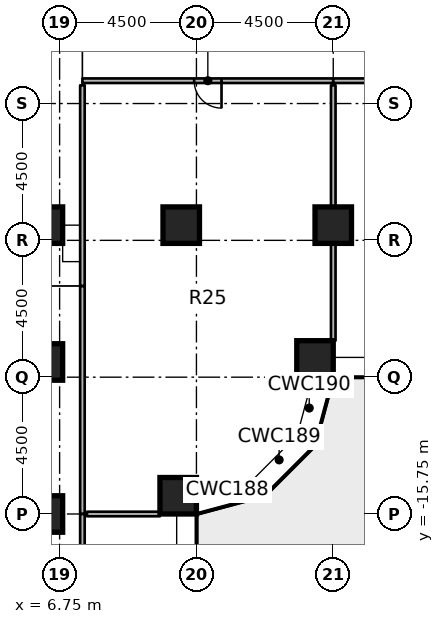
"""IFC4 building model, lengths in metres.
Left out: names, types, materials, properties, quantities, classifications, styles, units other than length and angle.
Written with IfcOpenShell. Run it as: python <this file> out.ifc"""

import sys

from ifc_helpers import new_model, si_unit, direction, frame, frame_2d, origin, origin_2d, place, context, subcontext, project, spatial, rectangle, extrude, element, fill, save


model = new_model("IFC4")
c1 = context("Model", 3, precision=1e-05, world=origin(), true_north=direction((0.0, 1.0)))
c2 = subcontext(c1, "Body", "Model", "MODEL_VIEW")
j1 = project(units=[si_unit("LENGTHUNIT", "METRE"), si_unit("PLANEANGLEUNIT", "RADIAN")], contexts=[c1])
p1 = place(None, origin())
s1 = spatial("IfcSite", under=j1, at=p1, CompositionType="ELEMENT")
p2 = place(p1, origin())
s2 = spatial("IfcBuilding", under=s1, at=p2, CompositionType="ELEMENT")
p3 = place(p2, frame((0.0, 0.0, 22.0)))
s3 = spatial("IfcBuildingStorey", under=s2, at=p3, CompositionType="ELEMENT", Elevation=22.0)
for number, where, z_axis, x_axis in (
    (1, (6.25, -15.75, 0.0), (0.0, 0.0, 1.0), (1.0, 0.0, 0.0)),
    (2, (6.25, -10.75, 0.0), (0.0, 0.0, 1.0), (1.0, 0.0, 0.0)),
    (3, (6.25, -6.25, 0.0), (0.0, 0.0, 1.0), (1.0, 0.0, 0.0)),
):
    element("IfcColumn", number, at=place(p3, frame(where, z_axis=z_axis, x_axis=x_axis)), inside=s3, PredefinedType="COLUMN", context=c2, shape_type="SweptSolid", body=[
        extrude(rectangle(XDim=1.2, YDim=1.2, at=origin_2d()), origin(), (0.0, 0.0, 1.0), 4.85),
    ])
p4 = place(p3, frame((10.65, -15.15, 0.0), z_axis=(0.0, 0.0, 1.0), x_axis=(1.0, 0.0, 0.0)))
e4 = element("IfcColumn", 4, at=p4, inside=s3, PredefinedType="COLUMN", context=c2, shape_type="SweptSolid", body=[
    extrude(rectangle(XDim=1.2, YDim=1.2, at=origin_2d()), origin(), (0.0, 0.0, 1.0), 4.55),
])
p5 = place(p3, frame((10.75, -6.25, 0.0), z_axis=(0.0, 0.0, 1.0), x_axis=(1.0, 0.0, 0.0)))
e5 = element("IfcColumn", 5, at=p5, inside=s3, PredefinedType="COLUMN", context=c2, shape_type="SweptSolid", body=[
    extrude(rectangle(XDim=1.2, YDim=1.2, at=origin_2d()), origin(), (0.0, 0.0, 1.0), 4.85),
])
p6 = place(p3, frame((15.15, -10.65, 0.0), z_axis=(0.0, 0.0, 1.0), x_axis=(1.0, 0.0, 0.0)))
e6 = element("IfcColumn", 6, at=p6, inside=s3, PredefinedType="COLUMN", context=c2, shape_type="SweptSolid", body=[
    extrude(rectangle(XDim=1.2, YDim=1.2, at=origin_2d()), origin(), (0.0, 0.0, 1.0), 4.55),
])
p7 = place(p3, frame((15.75, -6.25, 0.0), z_axis=(0.0, 0.0, 1.0), x_axis=(1.0, 0.0, 0.0)))
e7 = element("IfcColumn", 7, at=p7, inside=s3, PredefinedType="COLUMN", context=c2, shape_type="SweptSolid", body=[
    extrude(rectangle(XDim=1.2, YDim=1.2, at=origin_2d()), origin(), (0.0, 0.0, 1.0), 4.85),
])
p8 = place(p3, frame((7.5, -8.25, 0.0), z_axis=(0.0, 0.0, 1.0), x_axis=(0.0, -1.0, 0.0)))
e8 = element("IfcWall", 8, at=p8, inside=s3, PredefinedType="PARTITIONING", context=c2, shape_type="SweptSolid", body=[
    extrude(rectangle(XDim=7.5, YDim=0.15, at=frame_2d((3.75, 0.0))), origin(), (0.0, 0.0, 1.0), 3.93),
])
p9 = place(p3, frame((7.5, -15.75, 0.0), z_axis=(0.0, 0.0, 1.0), x_axis=(0.0, -1.0, 0.0)))
e9 = element("IfcWall", 9, at=p9, inside=s3, PredefinedType="PARTITIONING", context=c2, shape_type="SweptSolid", body=[
    extrude(rectangle(XDim=16.5, YDim=0.15, at=frame_2d((8.25, 0.0))), origin(), (0.0, 0.0, 1.0), 4.55),
])
p10 = place(p9, frame((7.25, 0.0, 0.0)))
e10 = element("IfcOpeningElement", 10, at=p10, cuts=e9, PredefinedType="OPENING", context=c2, shape_type="SweptSolid", body=[
    extrude(rectangle(XDim=0.9, YDim=2.1, at=frame_2d((0.45, 1.05))), frame((0.0, 0.085, 0.0), z_axis=(0.0, -1.0, 0.0), x_axis=(1.0, 0.0, 0.0)), (0.0, 0.0, 1.0), 0.17),
])
p11 = place(p3, frame((15.75, -1.5, 0.0), z_axis=(0.0, 0.0, 1.0), x_axis=(-1.0, 0.0, 0.0)))
e11 = element("IfcWall", 11, at=p11, inside=s3, PredefinedType="PARTITIONING", context=c2, shape_type="SweptSolid", body=[
    extrude(rectangle(XDim=8.25, YDim=0.15, at=frame_2d((4.125, 0.0))), origin(), (0.0, 0.0, 1.0), 4.063),
])
p12 = place(p11, frame((3.675, 0.0, 0.0)))
e12 = element("IfcOpeningElement", 12, at=p12, cuts=e11, PredefinedType="OPENING", context=c2, shape_type="SweptSolid", body=[
    extrude(rectangle(XDim=0.9, YDim=2.1, at=frame_2d((0.45, 1.05))), frame((0.0, 0.085, 0.0), z_axis=(0.0, -1.0, 0.0), x_axis=(1.0, 0.0, 0.0)), (0.0, 0.0, 1.0), 0.17),
])
p13 = place(p3, frame((37.65, -1.5, 0.0), z_axis=(0.0, 0.0, 1.0), x_axis=(-1.0, 0.0, 0.0)))
e13 = element("IfcWall", 13, at=p13, inside=s3, PredefinedType="PARTITIONING", context=c2, shape_type="SweptSolid", body=[
    extrude(rectangle(XDim=21.9, YDim=0.15, at=frame_2d((10.95, 0.0))), origin(), (0.0, 0.0, 1.0), 3.93),
])
p14 = place(p13, frame((10.2, 0.0, 0.0)))
e14 = element("IfcOpeningElement", 14, at=p14, cuts=e13, PredefinedType="OPENING", context=c2, shape_type="SweptSolid", body=[
    extrude(rectangle(XDim=0.9, YDim=2.1, at=frame_2d((0.45, 1.05))), frame((0.0, 0.085, 0.0), z_axis=(0.0, -1.0, 0.0), x_axis=(1.0, 0.0, 0.0)), (0.0, 0.0, 1.0), 0.17),
])
p15 = place(p3, frame((15.75, -1.65, 0.0), z_axis=(0.0, 0.0, 1.0), x_axis=(0.0, -1.0, 0.0)))
e15 = element("IfcWall", 15, at=p15, inside=s3, PredefinedType="PARTITIONING", context=c2, shape_type="SweptSolid", body=[
    extrude(rectangle(XDim=4.0, YDim=0.15, at=frame_2d((2.0, 0.0))), origin(), (0.0, 0.0, 1.0), 4.063),
])
p16 = place(p3, frame((15.75, -6.85, 0.0), z_axis=(0.0, 0.0, 1.0), x_axis=(0.0, -1.0, 0.0)))
e16 = element("IfcWall", 16, at=p16, inside=s3, PredefinedType="PARTITIONING", context=c2, shape_type="SweptSolid", body=[
    extrude(rectangle(XDim=3.2, YDim=0.15, at=frame_2d((1.6, 0.0))), origin(), (0.0, 0.0, 1.0), 4.55),
])
p17 = place(p3, frame((10.05, -15.75, 0.0), z_axis=(0.0, 0.0, 1.0), x_axis=(-1.0, 0.0, 0.0)))
e17 = element("IfcWall", 17, at=p17, inside=s3, PredefinedType="PARTITIONING", context=c2, shape_type="SweptSolid", body=[
    extrude(rectangle(XDim=2.4, YDim=0.15, at=frame_2d((1.2, 0.0))), origin(), (0.0, 0.0, 1.0), 4.55),
])
p18 = place(p3, frame((7.5, -8.25, 0.0), z_axis=(0.0, 0.0, 1.0), x_axis=(0.0, 1.0, 0.0)))
e18 = element("IfcWall", 18, at=p18, inside=s3, PredefinedType="PARTITIONING", context=c2, shape_type="SweptSolid", body=[
    extrude(rectangle(XDim=6.6, YDim=0.15, at=frame_2d((3.3, 0.0))), origin(), (0.0, 0.0, 1.0), 3.911),
])
p19 = place(p12, origin())
e19 = element("IfcDoor", 19, at=p19, inside=s3, OperationType="SINGLE_SWING_LEFT", PredefinedType="DOOR", context=c2, shape_type="SweptSolid", body=[
    extrude(rectangle(XDim=0.9, YDim=2.1, at=frame_2d((0.45, 1.05))), frame((0.0, 0.025, 0.0), z_axis=(0.0, -1.0, 0.0), x_axis=(1.0, 0.0, 0.0)), (0.0, 0.0, 1.0), 0.05),
])
fill(e12, e19)
save(model, sys.argv[1])
